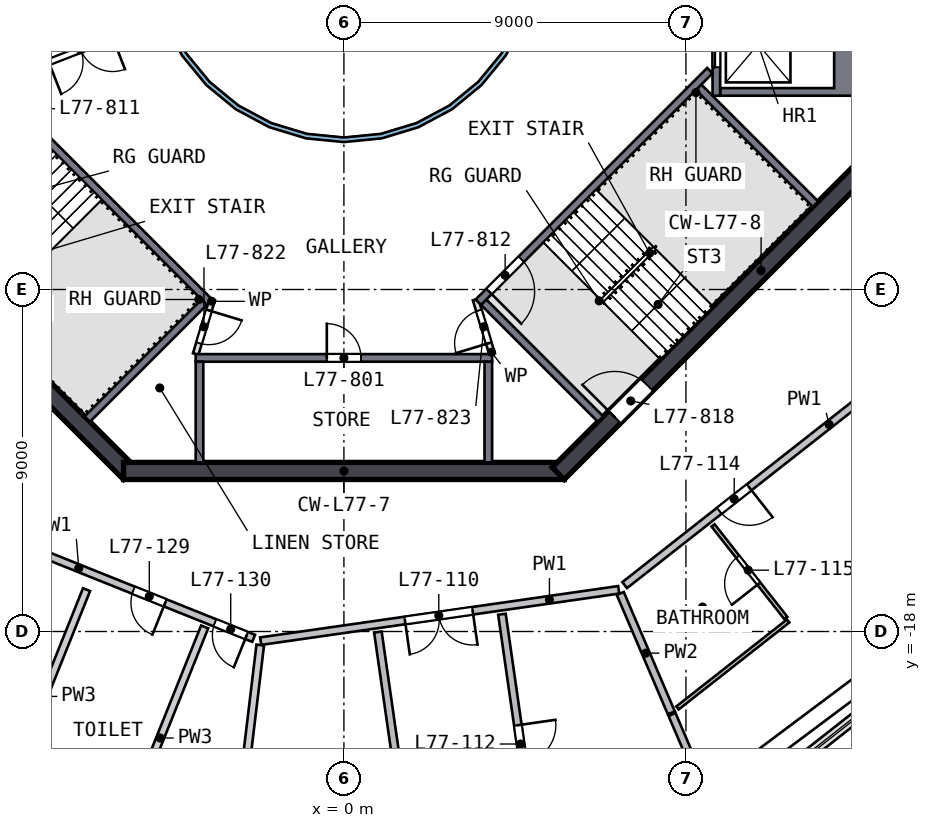
"""IFC4 building model, lengths in metres.
Left out: names, types, materials, properties, quantities, classifications, styles, units other than length and angle.
Written with IfcOpenShell. Run it as: python <this file> out.ifc"""

import sys

from ifc_helpers import new_model, si_unit, direction, frame, frame_2d, origin, place, context, subcontext, project, spatial, polyline, rectangle, outline, extrude, element, fill, save


model = new_model("IFC4")
c1 = context("Model", 3, precision=1e-05, world=origin(), true_north=direction((0.0, 1.0)))
c2 = subcontext(c1, "Body", "Model", "MODEL_VIEW")
j1 = project(units=[si_unit("LENGTHUNIT", "METRE"), si_unit("PLANEANGLEUNIT", "RADIAN")], contexts=[c1])
p1 = place(None, origin())
s1 = spatial("IfcSite", under=j1, at=p1, CompositionType="ELEMENT")
p2 = place(p1, origin())
s2 = spatial("IfcBuilding", under=s1, at=p2, CompositionType="ELEMENT")
p3 = place(p2, frame((0.0, 0.0, 310.0)))
s3 = spatial("IfcBuildingStorey", under=s2, at=p3, CompositionType="ELEMENT", Elevation=310.0)
p4 = place(p3, frame((-13.841, -5.64, 0.0), z_axis=(0.0, 0.0, 1.0), x_axis=(0.707106781, -0.707106781, 0.0)))
e1 = element("IfcWall", 1, at=p4, inside=s3, PredefinedType="SHEAR", context=c2, shape_type="SweptSolid", body=[
    extrude(rectangle(XDim=11.598, YDim=0.45, at=frame_2d((5.799, 0.0))), origin(), (0.0, 0.0, 1.0), 5.0),
])
p5 = place(p4, frame((2.099, 0.0, 0.0)))
e2 = element("IfcOpeningElement", 2, at=p5, cuts=e1, PredefinedType="OPENING", context=c2, shape_type="SweptSolid", body=[
    extrude(rectangle(XDim=1.2, YDim=2.1, at=frame_2d((0.6, 1.05))), frame((0.0, 0.235, 0.0), z_axis=(0.0, -1.0, 0.0), x_axis=(1.0, 0.0, 0.0)), (0.0, 0.0, 1.0), 0.47),
])
p6 = place(p3, frame((-5.799, -13.775, 0.0), z_axis=(0.0, 0.0, 1.0), x_axis=(1.0, 0.0, 0.0)))
e3 = element("IfcWall", 3, at=p6, inside=s3, PredefinedType="SHEAR", context=c2, shape_type="SweptSolid", body=[
    extrude(rectangle(XDim=11.598, YDim=0.45, at=frame_2d((5.799, 0.0))), origin(), (0.0, 0.0, 1.0), 5.0),
])
p7 = place(p3, frame((5.64, -13.841, 0.0), z_axis=(0.0, 0.0, 1.0), x_axis=(0.707106781, 0.707106781, 0.0)))
e4 = element("IfcWall", 4, at=p7, inside=s3, PredefinedType="SHEAR", context=c2, shape_type="SweptSolid", body=[
    extrude(rectangle(XDim=11.598, YDim=0.45, at=frame_2d((5.799, 0.0))), origin(), (0.0, 0.0, 1.0), 5.0),
])
p8 = place(p7, frame((2.099, 0.0, 0.0)))
e5 = element("IfcOpeningElement", 5, at=p8, cuts=e4, PredefinedType="OPENING", context=c2, shape_type="SweptSolid", body=[
    extrude(rectangle(XDim=1.2, YDim=2.1, at=frame_2d((0.6, 1.05))), frame((0.0, 0.235, 0.0), z_axis=(0.0, -1.0, 0.0), x_axis=(1.0, 0.0, 0.0)), (0.0, 0.0, 1.0), 0.47),
])
p9 = place(p3, origin())
e6 = element("IfcWall", 6, at=p9, inside=s3, PredefinedType="SOLIDWALL", context=c2, shape_type="SweptSolid", body=[
    extrude(outline(polyline([(13.55, -3.9), (9.9, -3.9), (9.9, -3.7), (12.9, -3.7), (12.9, -1.4), (9.9, -1.4), (9.9, -1.2), (13.55, -1.2), (13.55, -3.9)])), origin(), (0.0, 0.0, 1.0), 4.6),
])
p10 = place(p3, frame((9.8, -1.2, 0.0), z_axis=(0.0, 0.0, 1.0), x_axis=(0.0, -1.0, 0.0)))
e7 = element("IfcWall", 7, at=p10, inside=s3, PredefinedType="SOLIDWALL", context=c2, shape_type="SweptSolid", body=[
    extrude(rectangle(XDim=2.7, YDim=0.2, at=frame_2d((1.35, 0.0))), origin(), (0.0, 0.0, 1.0), 4.6),
])
p11 = place(p10, frame((0.75, 0.0, 0.0)))
e8 = element("IfcOpeningElement", 8, at=p11, cuts=e7, PredefinedType="OPENING", context=c2, shape_type="SweptSolid", body=[
    extrude(rectangle(XDim=1.2, YDim=2.1, at=frame_2d((0.6, 1.05))), frame((0.0, 0.11, 0.0), z_axis=(0.0, -1.0, 0.0), x_axis=(1.0, 0.0, 0.0)), (0.0, 0.0, 1.0), 0.22),
])
p12 = place(p3, frame((-3.9, -10.8, 0.0), z_axis=(0.0, 0.0, 1.0), x_axis=(1.0, 0.0, 0.0)))
e9 = element("IfcWall", 9, at=p12, inside=s3, PredefinedType="SOLIDWALL", context=c2, shape_type="SweptSolid", body=[
    extrude(rectangle(XDim=7.8, YDim=0.2, at=frame_2d((3.9, 0.0))), origin(), (0.0, 0.0, 1.0), 4.6),
])
p13 = place(p12, frame((3.45, 0.0, 0.0)))
e10 = element("IfcOpeningElement", 10, at=p13, cuts=e9, PredefinedType="OPENING", context=c2, shape_type="SweptSolid", body=[
    extrude(rectangle(XDim=0.9, YDim=2.1, at=frame_2d((0.45, 1.05))), frame((0.0, 0.11, 0.0), z_axis=(0.0, -1.0, 0.0), x_axis=(1.0, 0.0, 0.0)), (0.0, 0.0, 1.0), 0.22),
])
for number, where, z_axis, x_axis in (
    (11, (-3.8, -10.9, 0.0), (0.0, 0.0, 1.0), (0.0, -1.0, 0.0)),
    (12, (3.8, -10.9, 0.0), (0.0, 0.0, 1.0), (0.0, -1.0, 0.0)),
):
    element("IfcWall", number, at=place(p3, frame(where, z_axis=z_axis, x_axis=x_axis)), inside=s3, PredefinedType="SOLIDWALL", context=c2, shape_type="SweptSolid", body=[
        extrude(rectangle(XDim=2.65, YDim=0.2, at=frame_2d((1.325, 0.0))), origin(), (0.0, 0.0, 1.0), 4.6),
    ])
p14 = place(p3, frame((-3.535, -9.334, 0.0), z_axis=(0.0, 0.0, 1.0), x_axis=(-0.707120946, 0.707092617, 0.0)))
e13 = element("IfcWall", 13, at=p14, inside=s3, PredefinedType="SOLIDWALL", context=c2, shape_type="SweptSolid", body=[
    extrude(rectangle(XDim=8.618, YDim=0.2, at=frame_2d((4.309, 0.0))), origin(), (0.0, 0.0, 1.0), 4.6),
])
p15 = place(p14, frame((6.6, 0.0, 0.0)))
e14 = element("IfcOpeningElement", 14, at=p15, cuts=e13, PredefinedType="OPENING", context=c2, shape_type="SweptSolid", body=[
    extrude(rectangle(XDim=1.2, YDim=2.1, at=frame_2d((0.6, 1.05))), frame((0.0, 0.11, 0.0), z_axis=(0.0, -1.0, 0.0), x_axis=(1.0, 0.0, 0.0)), (0.0, 0.0, 1.0), 0.22),
])
p16 = place(p3, frame((-3.677, -9.334, 0.0), z_axis=(0.0, 0.0, 1.0), x_axis=(-0.707106781, -0.707106781, 0.0)))
e15 = element("IfcWall", 15, at=p16, inside=s3, PredefinedType="SOLIDWALL", context=c2, shape_type="SweptSolid", body=[
    extrude(rectangle(XDim=4.35, YDim=0.2, at=frame_2d((2.175, 0.0))), origin(), (0.0, 0.0, 1.0), 4.6),
])
p17 = place(p3, frame((9.629, -3.24, 0.0), z_axis=(0.0, 0.0, 1.0), x_axis=(-0.707120946, -0.707092617, 0.0)))
e16 = element("IfcWall", 16, at=p17, inside=s3, PredefinedType="SOLIDWALL", context=c2, shape_type="SweptSolid", body=[
    extrude(rectangle(XDim=8.618, YDim=0.2, at=frame_2d((4.309, 0.0))), origin(), (0.0, 0.0, 1.0), 4.6),
])
p18 = place(p17, frame((7.018, 0.0, 0.0)))
e17 = element("IfcOpeningElement", 17, at=p18, cuts=e16, PredefinedType="OPENING", context=c2, shape_type="SweptSolid", body=[
    extrude(rectangle(XDim=1.2, YDim=2.1, at=frame_2d((0.6, 1.05))), frame((0.0, 0.11, 0.0), z_axis=(0.0, -1.0, 0.0), x_axis=(1.0, 0.0, 0.0)), (0.0, 0.0, 1.0), 0.22),
])
for number, where, z_axis, x_axis in (
    (18, (3.677, -9.334, 0.0), (0.0, 0.0, 1.0), (0.707, -0.707, 0.0)),
    (19, (9.334, -3.677, 0.0), (0.0, 0.0, 1.0), (0.707, -0.707, 0.0)),
):
    element("IfcWall", number, at=place(p3, frame(where, z_axis=z_axis, x_axis=x_axis)), inside=s3, PredefinedType="SOLIDWALL", context=c2, shape_type="SweptSolid", body=[
        extrude(rectangle(XDim=4.35, YDim=0.2, at=frame_2d((2.175, 0.0))), origin(), (0.0, 0.0, 1.0), 4.6),
    ])
p19 = place(p3, frame((-3.465, -9.263, 0.0), z_axis=(0.0, 0.0, 1.0), x_axis=(-0.289808785, -0.957084567, 0.0)))
e20 = element("IfcWall", 20, at=p19, inside=s3, PredefinedType="PARTITIONING", context=c2, shape_type="SweptSolid", body=[
    extrude(rectangle(XDim=1.501, YDim=0.15, at=frame_2d((0.75, 0.0))), origin(), (0.0, 0.0, 1.0), 4.6),
])
p20 = place(p19, frame((0.301, 0.0, 0.0)))
e21 = element("IfcOpeningElement", 21, at=p20, cuts=e20, PredefinedType="OPENING", context=c2, shape_type="SweptSolid", body=[
    extrude(rectangle(XDim=0.9, YDim=2.1, at=frame_2d((0.45, 1.05))), frame((0.0, 0.085, 0.0), z_axis=(0.0, -1.0, 0.0), x_axis=(1.0, 0.0, 0.0)), (0.0, 0.0, 1.0), 0.17),
])
p21 = place(p3, frame((3.9, -10.7, 0.0), z_axis=(0.0, 0.0, 1.0), x_axis=(-0.289808785, 0.957084567, 0.0)))
e22 = element("IfcWall", 22, at=p21, inside=s3, PredefinedType="PARTITIONING", context=c2, shape_type="SweptSolid", body=[
    extrude(rectangle(XDim=1.501, YDim=0.15, at=frame_2d((0.75, 0.0))), origin(), (0.0, 0.0, 1.0), 4.6),
])
p22 = place(p21, frame((0.301, 0.0, 0.0)))
e23 = element("IfcOpeningElement", 23, at=p22, cuts=e22, PredefinedType="OPENING", context=c2, shape_type="SweptSolid", body=[
    extrude(rectangle(XDim=0.9, YDim=2.1, at=frame_2d((0.45, 1.05))), frame((0.0, 0.085, 0.0), z_axis=(0.0, -1.0, 0.0), x_axis=(1.0, 0.0, 0.0)), (0.0, 0.0, 1.0), 0.17),
])
p23 = place(p3, frame((-4.782, -1.857, 0.0), z_axis=(0.0, 0.0, 1.0), x_axis=(-0.932167228, -0.36202798, 0.0)))
e24 = element("IfcWall", 24, at=p23, inside=s3, PredefinedType="PARTITIONING", context=c2, shape_type="SweptSolid", body=[
    extrude(rectangle(XDim=4.676, YDim=0.15, at=frame_2d((2.338, 0.0))), origin(), (0.0, 0.0, 1.0), 4.6),
])
p24 = place(p23, frame((1.4, 0.0, 0.0)))
e25 = element("IfcOpeningElement", 25, at=p24, cuts=e24, PredefinedType="OPENING", context=c2, shape_type="SweptSolid", body=[
    extrude(rectangle(XDim=1.8, YDim=2.1, at=frame_2d((0.9, 1.05))), frame((0.0, 0.085, 0.0), z_axis=(0.0, -1.0, 0.0), x_axis=(1.0, 0.0, 0.0)), (0.0, 0.0, 1.0), 0.17),
])
p25 = place(p3, origin())
e26 = element("IfcWall", 26, at=p25, inside=s3, PredefinedType="SOLIDWALL", context=c2, shape_type="SweptSolid", body=[
    extrude(outline(polyline([(5.021, -0.999), (4.73, -1.959), (4.257, -2.844), (3.62, -3.62), (2.844, -4.257), (1.959, -4.73), (0.999, -5.021), (0.0, -5.12), (-0.999, -5.021), (-1.959, -4.73), (-2.844, -4.257), (-3.62, -3.62), (-4.257, -2.844), (-4.73, -1.959), (-5.021, -0.999), (-5.12, 0.0), (-5.021, 0.999), (-4.73, 1.959), (-4.257, 2.844), (-3.62, 3.62), (-2.844, 4.257), (-1.959, 4.73), (-0.999, 5.021), (0.0, 5.12), (0.999, 5.021), (1.959, 4.73), (2.844, 4.257), (3.62, 3.62), (4.257, 2.844), (4.73, 1.959), (5.021, 0.999), (5.12, 0.0), (5.021, -0.999)]), holes=[polyline([(4.904, 0.976), (4.619, 1.913), (4.157, 2.778), (3.535, 3.535), (2.778, 4.157), (1.913, 4.619), (0.976, 4.904), (0.0, 5.0), (-0.976, 4.904), (-1.913, 4.619), (-2.778, 4.157), (-3.535, 3.535), (-4.157, 2.778), (-4.619, 1.913), (-4.904, 0.976), (-5.0, 0.0), (-4.904, -0.976), (-4.619, -1.913), (-4.157, -2.778), (-3.535, -3.535), (-2.778, -4.157), (-1.913, -4.619), (-0.976, -4.904), (0.0, -5.0), (0.976, -4.904), (1.913, -4.619), (2.778, -4.157), (3.535, -3.535), (4.157, -2.778), (4.619, -1.913), (4.904, -0.976), (5.0, 0.0), (4.904, 0.976)])]), origin(), (0.0, 0.0, 1.0), 4.6),
])
p26 = place(p3, frame((-2.375, -18.179, 0.0), z_axis=(0.0, 0.0, 1.0), x_axis=(-0.928230848, 0.372004694, 0.0)))
e27 = element("IfcWall", 27, at=p26, inside=s3, PredefinedType="SOLIDWALL", context=c2, shape_type="SweptSolid", body=[
    extrude(rectangle(XDim=9.116, YDim=0.2, at=frame_2d((4.558, 0.0))), origin(), (0.0, 0.0, 1.0), 4.6),
])
p27 = place(p26, frame((6.508, 0.0, 0.0)))
e28 = element("IfcOpeningElement", 28, at=p27, cuts=e27, PredefinedType="OPENING", context=c2, shape_type="SweptSolid", body=[
    extrude(rectangle(XDim=0.9, YDim=2.1, at=frame_2d((0.45, 1.05))), frame((0.0, 0.11, 0.0), z_axis=(0.0, -1.0, 0.0), x_axis=(1.0, 0.0, 0.0)), (0.0, 0.0, 1.0), 0.22),
])
p28 = place(p26, frame((2.508, 0.0, 0.0)))
e29 = element("IfcOpeningElement", 29, at=p28, cuts=e27, PredefinedType="OPENING", context=c2, shape_type="SweptSolid", body=[
    extrude(rectangle(XDim=0.9, YDim=2.1, at=frame_2d((0.45, 1.05))), frame((0.0, 0.11, 0.0), z_axis=(0.0, -1.0, 0.0), x_axis=(1.0, 0.0, 0.0)), (0.0, 0.0, 1.0), 0.22),
])
p29 = place(p26, frame((0.2, 0.0, 0.0)))
e30 = element("IfcOpeningElement", 30, at=p29, cuts=e27, PredefinedType="OPENING", context=c2, shape_type="SweptSolid", body=[
    extrude(rectangle(XDim=0.9, YDim=2.1, at=frame_2d((0.45, 1.05))), frame((0.0, 0.11, 0.0), z_axis=(0.0, -1.0, 0.0), x_axis=(1.0, 0.0, 0.0)), (0.0, 0.0, 1.0), 0.22),
])
p30 = place(p3, frame((7.231, -16.903, 0.0), z_axis=(0.0, 0.0, 1.0), x_axis=(-0.989874961, -0.141942107, 0.0)))
e31 = element("IfcWall", 31, at=p30, inside=s3, PredefinedType="SOLIDWALL", context=c2, shape_type="SweptSolid", body=[
    extrude(rectangle(XDim=9.517, YDim=0.2, at=frame_2d((4.758, 0.0))), origin(), (0.0, 0.0, 1.0), 4.6),
])
p31 = place(p30, frame((3.882, 0.0, 0.0)))
e32 = element("IfcOpeningElement", 32, at=p31, cuts=e31, PredefinedType="OPENING", context=c2, shape_type="SweptSolid", body=[
    extrude(rectangle(XDim=1.8, YDim=2.1, at=frame_2d((0.9, 1.05))), frame((0.0, 0.11, 0.0), z_axis=(0.0, -1.0, 0.0), x_axis=(1.0, 0.0, 0.0)), (0.0, 0.0, 1.0), 0.22),
])
p32 = place(p3, frame((14.713, -11.023, 0.0), z_axis=(0.0, 0.0, 1.0), x_axis=(-0.78628742, -0.617860902, 0.0)))
e33 = element("IfcWall", 33, at=p32, inside=s3, PredefinedType="SOLIDWALL", context=c2, shape_type="SweptSolid", body=[
    extrude(rectangle(XDim=9.316, YDim=0.2, at=frame_2d((4.658, 0.0))), origin(), (0.0, 0.0, 1.0), 4.6),
])
p33 = place(p32, frame((5.15, 0.0, 0.0)))
e34 = element("IfcOpeningElement", 34, at=p33, cuts=e33, PredefinedType="OPENING", context=c2, shape_type="SweptSolid", body=[
    extrude(rectangle(XDim=1.0, YDim=2.1, at=frame_2d((0.5, 1.05))), frame((0.0, 0.11, 0.0), z_axis=(0.0, -1.0, 0.0), x_axis=(1.0, 0.0, 0.0)), (0.0, 0.0, 1.0), 0.22),
])
p34 = place(p3, frame((2.356, -28.211, 0.0), z_axis=(0.0, 0.0, 1.0), x_axis=(-0.141932284, 0.989876369, 0.0)))
e35 = element("IfcWall", 35, at=p34, inside=s3, PredefinedType="SOLIDWALL", context=c2, shape_type="SweptSolid", body=[
    extrude(rectangle(XDim=10.302, YDim=0.2, at=frame_2d((5.151, 0.0))), origin(), (0.0, 0.0, 1.0), 4.6),
])
p35 = place(p34, frame((2.5, 0.0, 0.0)))
e36 = element("IfcOpeningElement", 36, at=p35, cuts=e35, PredefinedType="OPENING", context=c2, shape_type="SweptSolid", body=[
    extrude(rectangle(XDim=1.0, YDim=2.1, at=frame_2d((0.5, 1.05))), frame((0.0, 0.11, 0.0), z_axis=(0.0, -1.0, 0.0), x_axis=(1.0, 0.0, 0.0)), (0.0, 0.0, 1.0), 0.22),
])
p36 = place(p3, frame((4.158, -17.546, 0.0), z_axis=(0.0, 0.0, 1.0), x_axis=(0.141928955, -0.989876847, 0.0)))
e37 = element("IfcWall", 37, at=p36, inside=s3, PredefinedType="SOLIDWALL", context=c2, shape_type="SweptSolid", body=[
    extrude(rectangle(XDim=10.302, YDim=0.2, at=frame_2d((5.151, 0.0))), origin(), (0.0, 0.0, 1.0), 4.6),
])
p37 = place(p36, frame((2.95, 0.0, 0.0)))
e38 = element("IfcOpeningElement", 38, at=p37, cuts=e37, PredefinedType="OPENING", context=c2, shape_type="SweptSolid", body=[
    extrude(rectangle(XDim=1.0, YDim=2.1, at=frame_2d((0.5, 1.05))), frame((0.0, 0.11, 0.0), z_axis=(0.0, -1.0, 0.0), x_axis=(1.0, 0.0, 0.0)), (0.0, 0.0, 1.0), 0.22),
])
p38 = place(p3, frame((7.271, -16.998, 0.0), z_axis=(0.0, 0.0, 1.0), x_axis=(0.393290003, -0.919414473, 0.0)))
e39 = element("IfcWall", 39, at=p38, inside=s3, PredefinedType="SOLIDWALL", context=c2, shape_type="SweptSolid", body=[
    extrude(rectangle(XDim=3.418, YDim=0.2, at=frame_2d((1.709, 0.0))), origin(), (0.0, 0.0, 1.0), 4.6),
])
p39 = place(p3, frame((8.634, -20.184, 0.0), z_axis=(0.0, 0.0, 1.0), x_axis=(0.393322695, -0.919400488, 0.0)))
e40 = element("IfcWall", 40, at=p39, inside=s3, PredefinedType="SOLIDWALL", context=c2, shape_type="SweptSolid", body=[
    extrude(rectangle(XDim=3.161, YDim=0.2, at=frame_2d((1.581, 0.0))), origin(), (0.0, 0.0, 1.0), 4.6),
])
p40 = place(p3, frame((11.69, -17.723, 0.0), z_axis=(0.0, 0.0, 1.0), x_axis=(-0.786279455, -0.617871038, 0.0)))
e41 = element("IfcWall", 41, at=p40, inside=s3, PredefinedType="PARTITIONING", context=c2, shape_type="SweptSolid", body=[
    extrude(rectangle(XDim=3.704, YDim=0.1, at=frame_2d((1.852, 0.0))), origin(), (0.0, 0.0, 1.0), 4.6),
])
p41 = place(p3, frame((11.628, -17.644, 0.0), z_axis=(0.0, 0.0, 1.0), x_axis=(-0.617842421, 0.786301941, 0.0)))
e42 = element("IfcWall", 42, at=p41, inside=s3, PredefinedType="PARTITIONING", context=c2, shape_type="SweptSolid", body=[
    extrude(rectangle(XDim=3.1, YDim=0.1, at=frame_2d((1.55, 0.0))), origin(), (0.0, 0.0, 1.0), 4.6),
])
p42 = place(p41, frame((1.15, 0.0, 0.0)))
e43 = element("IfcOpeningElement", 43, at=p42, cuts=e42, PredefinedType="OPENING", context=c2, shape_type="SweptSolid", body=[
    extrude(rectangle(XDim=0.9, YDim=2.1, at=frame_2d((0.45, 1.05))), frame((0.0, 0.06, 0.0), z_axis=(0.0, -1.0, 0.0), x_axis=(1.0, 0.0, 0.0)), (0.0, 0.0, 1.0), 0.12),
])
p43 = place(p3, frame((-6.773, -16.899, 0.0), z_axis=(0.0, 0.0, 1.0), x_axis=(-0.372023456, -0.928223329, 0.0)))
e44 = element("IfcWall", 44, at=p43, inside=s3, PredefinedType="SOLIDWALL", context=c2, shape_type="SweptSolid", body=[
    extrude(rectangle(XDim=6.052, YDim=0.2, at=frame_2d((3.026, 0.0))), origin(), (0.0, 0.0, 1.0), 4.6),
])
p44 = place(p3, frame((-3.664, -17.878, 0.0), z_axis=(0.0, 0.0, 1.0), x_axis=(-0.37201864, -0.928225259, 0.0)))
e45 = element("IfcWall", 45, at=p44, inside=s3, PredefinedType="SOLIDWALL", context=c2, shape_type="SweptSolid", body=[
    extrude(rectangle(XDim=6.3, YDim=0.2, at=frame_2d((3.15, 0.0))), origin(), (0.0, 0.0, 1.0), 4.6),
])
p45 = place(p3, frame((-2.991, -24.935, 0.0), z_axis=(0.0, 0.0, 1.0), x_axis=(0.119090008, 0.992883462, 0.0)))
e46 = element("IfcWall", 46, at=p45, inside=s3, PredefinedType="SOLIDWALL", context=c2, shape_type="SweptSolid", body=[
    extrude(rectangle(XDim=6.626, YDim=0.2, at=frame_2d((3.313, 0.0))), origin(), (0.0, 0.0, 1.0), 4.6),
])
p46 = place(p13, origin())
e47 = element("IfcDoor", 47, at=p46, inside=s3, OperationType="SINGLE_SWING_LEFT", PredefinedType="DOOR", context=c2, shape_type="SweptSolid", body=[
    extrude(rectangle(XDim=0.9, YDim=2.1, at=frame_2d((0.45, 1.05))), frame((0.0, 0.025, 0.0), z_axis=(0.0, -1.0, 0.0), x_axis=(1.0, 0.0, 0.0)), (0.0, 0.0, 1.0), 0.05),
])
fill(e10, e47)
p47 = place(p11, origin())
e48 = element("IfcDoor", 48, at=p47, inside=s3, OperationType="DOUBLE_DOOR_SLIDING", PredefinedType="DOOR", context=c2, shape_type="SweptSolid", body=[
    extrude(rectangle(XDim=1.2, YDim=2.1, at=frame_2d((0.6, 1.05))), frame((0.0, 0.025, 0.0), z_axis=(0.0, -1.0, 0.0), x_axis=(1.0, 0.0, 0.0)), (0.0, 0.0, 1.0), 0.05),
])
fill(e8, e48)
p48 = place(p18, origin())
e49 = element("IfcDoor", 49, at=p48, inside=s3, OperationType="SINGLE_SWING_RIGHT", PredefinedType="DOOR", context=c2, shape_type="SweptSolid", body=[
    extrude(rectangle(XDim=1.2, YDim=2.1, at=frame_2d((0.6, 1.05))), frame((0.0, 0.025, 0.0), z_axis=(0.0, -1.0, 0.0), x_axis=(1.0, 0.0, 0.0)), (0.0, 0.0, 1.0), 0.05),
])
fill(e17, e49)
p49 = place(p8, origin())
e50 = element("IfcDoor", 50, at=p49, inside=s3, OperationType="SINGLE_SWING_LEFT", PredefinedType="DOOR", context=c2, shape_type="SweptSolid", body=[
    extrude(rectangle(XDim=1.2, YDim=2.1, at=frame_2d((0.6, 1.05))), frame((0.0, 0.025, 0.0), z_axis=(0.0, -1.0, 0.0), x_axis=(1.0, 0.0, 0.0)), (0.0, 0.0, 1.0), 0.05),
])
fill(e5, e50)
p50 = place(p20, origin())
e51 = element("IfcDoor", 51, at=p50, inside=s3, OperationType="SINGLE_SWING_LEFT", PredefinedType="DOOR", context=c2, shape_type="SweptSolid", body=[
    extrude(rectangle(XDim=0.9, YDim=2.1, at=frame_2d((0.45, 1.05))), frame((0.0, 0.025, 0.0), z_axis=(0.0, -1.0, 0.0), x_axis=(1.0, 0.0, 0.0)), (0.0, 0.0, 1.0), 0.05),
])
fill(e21, e51)
p51 = place(p22, origin())
e52 = element("IfcDoor", 52, at=p51, inside=s3, OperationType="SINGLE_SWING_LEFT", PredefinedType="DOOR", context=c2, shape_type="SweptSolid", body=[
    extrude(rectangle(XDim=0.9, YDim=2.1, at=frame_2d((0.45, 1.05))), frame((0.0, 0.025, 0.0), z_axis=(0.0, -1.0, 0.0), x_axis=(1.0, 0.0, 0.0)), (0.0, 0.0, 1.0), 0.05),
])
fill(e23, e52)
p52 = place(p24, origin())
e53 = element("IfcDoor", 53, at=p52, inside=s3, OperationType="DOUBLE_DOOR_SINGLE_SWING", PredefinedType="DOOR", context=c2, shape_type="SweptSolid", body=[
    extrude(rectangle(XDim=1.8, YDim=2.1, at=frame_2d((0.9, 1.05))), frame((0.0, 0.025, 0.0), z_axis=(0.0, -1.0, 0.0), x_axis=(1.0, 0.0, 0.0)), (0.0, 0.0, 1.0), 0.05),
])
fill(e25, e53)
p53 = place(p31, origin())
e54 = element("IfcDoor", 54, at=p53, inside=s3, OperationType="DOUBLE_DOOR_SINGLE_SWING", PredefinedType="DOOR", context=c2, shape_type="SweptSolid", body=[
    extrude(rectangle(XDim=1.8, YDim=2.1, at=frame_2d((0.9, 1.05))), frame((0.0, 0.025, 0.0), z_axis=(0.0, -1.0, 0.0), x_axis=(1.0, 0.0, 0.0)), (0.0, 0.0, 1.0), 0.05),
])
fill(e32, e54)
p54 = place(p37, origin())
e55 = element("IfcDoor", 55, at=p54, inside=s3, OperationType="SINGLE_SWING_LEFT", PredefinedType="DOOR", context=c2, shape_type="SweptSolid", body=[
    extrude(rectangle(XDim=1.0, YDim=2.1, at=frame_2d((0.5, 1.05))), frame((0.0, 0.025, 0.0), z_axis=(0.0, -1.0, 0.0), x_axis=(1.0, 0.0, 0.0)), (0.0, 0.0, 1.0), 0.05),
])
fill(e38, e55)
p55 = place(p33, origin())
e56 = element("IfcDoor", 56, at=p55, inside=s3, OperationType="SINGLE_SWING_LEFT", PredefinedType="DOOR", context=c2, shape_type="SweptSolid", body=[
    extrude(rectangle(XDim=1.0, YDim=2.1, at=frame_2d((0.5, 1.05))), frame((0.0, 0.025, 0.0), z_axis=(0.0, -1.0, 0.0), x_axis=(1.0, 0.0, 0.0)), (0.0, 0.0, 1.0), 0.05),
])
fill(e34, e56)
p56 = place(p42, origin())
e57 = element("IfcDoor", 57, at=p56, inside=s3, OperationType="SINGLE_SWING_LEFT", PredefinedType="DOOR", context=c2, shape_type="SweptSolid", body=[
    extrude(rectangle(XDim=0.9, YDim=2.1, at=frame_2d((0.45, 1.05))), frame((0.0, 0.025, 0.0), z_axis=(0.0, -1.0, 0.0), x_axis=(1.0, 0.0, 0.0)), (0.0, 0.0, 1.0), 0.05),
])
fill(e43, e57)
p57 = place(p28, origin())
e58 = element("IfcDoor", 58, at=p57, inside=s3, OperationType="SINGLE_SWING_LEFT", PredefinedType="DOOR", context=c2, shape_type="SweptSolid", body=[
    extrude(rectangle(XDim=0.9, YDim=2.1, at=frame_2d((0.45, 1.05))), frame((0.0, 0.025, 0.0), z_axis=(0.0, -1.0, 0.0), x_axis=(1.0, 0.0, 0.0)), (0.0, 0.0, 1.0), 0.05),
])
fill(e29, e58)
p58 = place(p29, origin())
e59 = element("IfcDoor", 59, at=p58, inside=s3, OperationType="SINGLE_SWING_LEFT", PredefinedType="DOOR", context=c2, shape_type="SweptSolid", body=[
    extrude(rectangle(XDim=0.9, YDim=2.1, at=frame_2d((0.45, 1.05))), frame((0.0, 0.025, 0.0), z_axis=(0.0, -1.0, 0.0), x_axis=(1.0, 0.0, 0.0)), (0.0, 0.0, 1.0), 0.05),
])
fill(e30, e59)
save(model, sys.argv[1])
